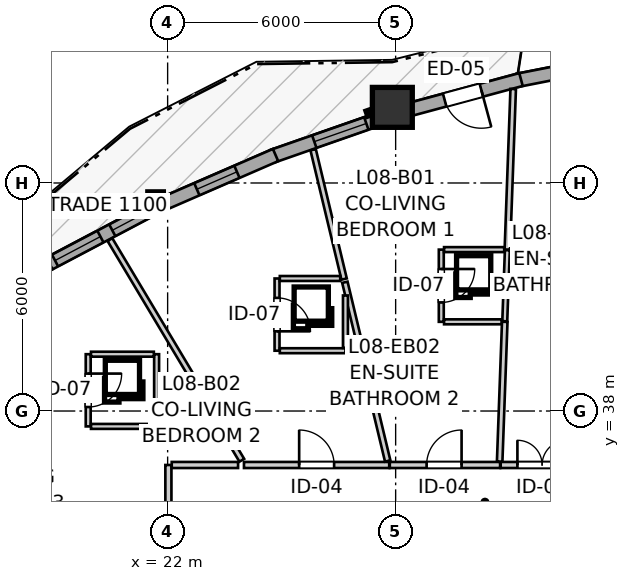
"""IFC4 building model, lengths in metres.
Left out: names, types, materials, properties, quantities, classifications, styles, units other than length and angle.
Written with IfcOpenShell. Run it as: python <this file> out.ifc"""

import sys

from ifc_helpers import new_model, si_unit, direction, frame, frame_2d, origin, origin_2d, place, context, subcontext, project, spatial, rectangle, i_section, extrude, source, transform, mapped, element, fill, save


model = new_model("IFC4")
c1 = context("Model", 3, precision=1e-05, world=origin(), true_north=direction((0.0, 1.0)))
c2 = subcontext(c1, "Body", "Model", "MODEL_VIEW")
j1 = project(units=[si_unit("LENGTHUNIT", "METRE"), si_unit("PLANEANGLEUNIT", "RADIAN")], contexts=[c1])
p1 = place(None, origin())
s1 = spatial("IfcSite", under=j1, at=p1, CompositionType="ELEMENT")
p2 = place(p1, origin())
s2 = spatial("IfcBuilding", under=s1, at=p2, CompositionType="ELEMENT")
p3 = place(p2, frame((0.0, 0.0, 30.2)))
s3 = spatial("IfcBuildingStorey", under=s2, at=p3, CompositionType="ELEMENT", Elevation=30.2)
m1 = source(origin(), c2, "Body", "SweptSolid", [
    extrude(rectangle(XDim=1.05, YDim=1.05, at=origin_2d()), origin(), (0.0, 0.0, 1.0), 2.935),
])
p4 = place(p3, frame((27.913, 45.99, 0.0), z_axis=(0.0, 0.0, 1.0), x_axis=(1.0, 0.0, 0.0)))
e1 = element("IfcColumn", 1, at=p4, inside=s3, PredefinedType="COLUMN", context=c2, shape_type="MappedRepresentation", body=[
    mapped(m1, transform((0.0, 0.0, 0.0), x_axis=(1.0, 0.0, 0.0), y_axis=(0.0, 1.0, 0.0), z_axis=(0.0, 0.0, 1.0), scale=1.0)),
])
m2 = source(origin(), c2, "Body", "SweptSolid", [
    extrude(i_section(OverallWidth=0.409, OverallDepth=0.425, WebThickness=0.03, FlangeThickness=0.048, FilletRadius=0.015, at=origin_2d()), origin(), (0.0, 0.0, 1.0), 2.935),
])
p5 = place(p3, frame((21.683, 43.554, 0.0), z_axis=(0.0, 0.0, 1.0), x_axis=(1.0, 0.0, 0.0)))
e2 = element("IfcColumn", 2, at=p5, inside=s3, PredefinedType="PILASTER", context=c2, shape_type="MappedRepresentation", body=[
    mapped(m2, transform((0.0, 0.0, 0.0), x_axis=(1.0, 0.0, 0.0), y_axis=(0.0, 1.0, 0.0), z_axis=(0.0, 0.0, 1.0), scale=1.0)),
])
p6 = place(p3, frame((34.659, 47.38, 0.0), z_axis=(0.0, 0.0, 1.0), x_axis=(-0.981222284826, -0.19288034571, 0.0)))
e3 = element("IfcWall", 3, at=p6, inside=s3, PredefinedType="SOLIDWALL", context=c2, shape_type="SweptSolid", body=[
    extrude(rectangle(XDim=3.512, YDim=0.35, at=frame_2d((1.756, 0.0))), origin(), (0.0, 0.0, 1.0), 2.415),
])
p7 = place(p6, frame((1.021, 0.0, 0.82)))
e4 = element("IfcOpeningElement", 4, at=p7, cuts=e3, PredefinedType="OPENING", context=c2, shape_type="SweptSolid", body=[
    extrude(rectangle(XDim=1.45, YDim=1.25, at=frame_2d((0.725, 0.625))), frame((0.0, 0.185, 0.0), z_axis=(0.0, -1.0, 0.0), x_axis=(1.0, 0.0, 0.0)), (0.0, 0.0, 1.0), 0.37),
])
p8 = place(p3, frame((31.298, 46.722, 0.0), z_axis=(0.0, 0.0, 1.0), x_axis=(-0.965455913242, -0.260566459057, 0.0)))
e5 = element("IfcWall", 5, at=p8, inside=s3, PredefinedType="SOLIDWALL", context=c2, shape_type="SweptSolid", body=[
    extrude(rectangle(XDim=3.159, YDim=0.35, at=frame_2d((1.58, 0.0))), origin(), (0.0, 0.0, 1.0), 2.415),
])
p9 = place(p8, frame((1.08, 0.0, 0.0)))
e6 = element("IfcOpeningElement", 6, at=p9, cuts=e5, PredefinedType="OPENING", context=c2, shape_type="SweptSolid", body=[
    extrude(rectangle(XDim=1.0, YDim=2.1, at=frame_2d((0.5, 1.05))), frame((0.0, 0.185, 0.0), z_axis=(0.0, -1.0, 0.0), x_axis=(1.0, 0.0, 0.0)), (0.0, 0.0, 1.0), 0.37),
])
p10 = place(p3, frame((27.687, 45.726, 0.0), z_axis=(0.0, 0.0, 1.0), x_axis=(-0.9441205041, -0.329600475936, 0.0)))
e7 = element("IfcWall", 7, at=p10, inside=s3, PredefinedType="SOLIDWALL", context=c2, shape_type="SweptSolid", body=[
    extrude(rectangle(XDim=3.104, YDim=0.35, at=frame_2d((1.552, 0.0))), origin(), (0.0, 0.0, 1.0), 2.415),
])
p11 = place(p10, frame((0.486, 0.0, 0.82)))
e8 = element("IfcOpeningElement", 8, at=p11, cuts=e7, PredefinedType="OPENING", context=c2, shape_type="SweptSolid", body=[
    extrude(rectangle(XDim=1.45, YDim=1.25, at=frame_2d((0.725, 0.625))), frame((0.0, 0.185, 0.0), z_axis=(0.0, -1.0, 0.0), x_axis=(1.0, 0.0, 0.0)), (0.0, 0.0, 1.0), 0.37),
])
p12 = place(p3, frame((24.84, 44.735, 0.0), z_axis=(0.0, 0.0, 1.0), x_axis=(-0.917090935142, -0.398678086532, 0.0)))
e9 = element("IfcWall", 9, at=p12, inside=s3, PredefinedType="SOLIDWALL", context=c2, shape_type="SweptSolid", body=[
    extrude(rectangle(XDim=3.346, YDim=0.35, at=frame_2d((1.673, 0.0))), origin(), (0.0, 0.0, 1.0), 2.415),
])
p13 = place(p12, frame((1.108, 0.0, 0.82)))
e10 = element("IfcOpeningElement", 10, at=p13, cuts=e9, PredefinedType="OPENING", context=c2, shape_type="SweptSolid", body=[
    extrude(rectangle(XDim=1.15, YDim=1.2, at=frame_2d((0.575, 0.6))), frame((0.0, 0.185, 0.0), z_axis=(0.0, -1.0, 0.0), x_axis=(1.0, 0.0, 0.0)), (0.0, 0.0, 1.0), 0.37),
])
p14 = place(p3, frame((21.747, 43.39, 0.0), z_axis=(0.0, 0.0, 1.0), x_axis=(-0.88437802144, -0.46677137358, 0.0)))
e11 = element("IfcWall", 11, at=p14, inside=s3, PredefinedType="SOLIDWALL", context=c2, shape_type="SweptSolid", body=[
    extrude(rectangle(XDim=3.327, YDim=0.35, at=frame_2d((1.664, 0.0))), origin(), (0.0, 0.0, 1.0), 2.415),
])
p15 = place(p14, frame((0.311, 0.0, 0.82)))
e12 = element("IfcOpeningElement", 12, at=p15, cuts=e11, PredefinedType="OPENING", context=c2, shape_type="SweptSolid", body=[
    extrude(rectangle(XDim=1.05, YDim=1.45, at=frame_2d((0.525, 0.725))), frame((0.0, 0.185, 0.0), z_axis=(0.0, -1.0, 0.0), x_axis=(1.0, 0.0, 0.0)), (0.0, 0.0, 1.0), 0.37),
])
p16 = place(p14, frame((1.714, 0.0, 0.82)))
e13 = element("IfcOpeningElement", 13, at=p16, cuts=e11, PredefinedType="OPENING", context=c2, shape_type="SweptSolid", body=[
    extrude(rectangle(XDim=1.35, YDim=1.45, at=frame_2d((0.675, 0.725))), frame((0.0, 0.185, 0.0), z_axis=(0.0, -1.0, 0.0), x_axis=(1.0, 0.0, 0.0)), (0.0, 0.0, 1.0), 0.37),
])
p17 = place(p3, frame((18.882, 41.882, 0.0), z_axis=(0.0, 0.0, 1.0), x_axis=(-0.846428134238, -0.53250297048, 0.0)))
e14 = element("IfcWall", 14, at=p17, inside=s3, PredefinedType="SOLIDWALL", context=c2, shape_type="SweptSolid", body=[
    extrude(rectangle(XDim=3.047, YDim=0.35, at=frame_2d((1.523, 0.0))), origin(), (0.0, 0.0, 1.0), 2.415),
])
p18 = place(p17, frame((0.803, 0.0, 0.82)))
e15 = element("IfcOpeningElement", 15, at=p18, cuts=e14, PredefinedType="OPENING", context=c2, shape_type="SweptSolid", body=[
    extrude(rectangle(XDim=1.45, YDim=1.25, at=frame_2d((0.725, 0.625))), frame((0.0, 0.185, 0.0), z_axis=(0.0, -1.0, 0.0), x_axis=(1.0, 0.0, 0.0)), (0.0, 0.0, 1.0), 0.37),
])
p19 = place(p3, frame((22.02, 32.71, 0.0), z_axis=(0.0, 0.0, 1.0), x_axis=(0.0, 1.0, 0.0)))
e16 = element("IfcWall", 16, at=p19, inside=s3, PredefinedType="PARTITIONING", context=c2, shape_type="SweptSolid", body=[
    extrude(rectangle(XDim=3.87, YDim=0.16, at=frame_2d((1.935, 0.0))), origin(), (0.0, 0.0, 1.0), 2.935),
])
p20 = place(p19, frame((1.485, 0.0, 0.0)))
e17 = element("IfcOpeningElement", 17, at=p20, cuts=e16, PredefinedType="OPENING", context=c2, shape_type="SweptSolid", body=[
    extrude(rectangle(XDim=0.92, YDim=2.1, at=frame_2d((0.46, 1.05))), frame((0.0, 0.09, 0.0), z_axis=(0.0, -1.0, 0.0), x_axis=(1.0, 0.0, 0.0)), (0.0, 0.0, 1.0), 0.18),
])
p21 = place(p3, frame((24.009, 36.58, 0.0), z_axis=(0.0, 0.0, 1.0), x_axis=(1.0, 0.0, 0.0)))
e18 = element("IfcWall", 18, at=p21, inside=s3, PredefinedType="PARTITIONING", context=c2, shape_type="SweptSolid", body=[
    extrude(rectangle(XDim=3.822, YDim=0.16, at=frame_2d((1.911, 0.0))), origin(), (0.0, 0.0, 1.0), 2.543),
])
p22 = place(p21, frame((1.452, 0.0, 0.0)))
e19 = element("IfcOpeningElement", 19, at=p22, cuts=e18, PredefinedType="OPENING", context=c2, shape_type="SweptSolid", body=[
    extrude(rectangle(XDim=0.92, YDim=2.1, at=frame_2d((0.46, 1.05))), frame((0.0, 0.09, 0.0), z_axis=(0.0, -1.0, 0.0), x_axis=(1.0, 0.0, 0.0)), (0.0, 0.0, 1.0), 0.18),
])
p23 = place(p3, frame((27.846, 36.58, 0.0), z_axis=(0.0, 0.0, 1.0), x_axis=(1.0, 0.0, 0.0)))
e20 = element("IfcWall", 20, at=p23, inside=s3, PredefinedType="PARTITIONING", context=c2, shape_type="SweptSolid", body=[
    extrude(rectangle(XDim=2.903, YDim=0.16, at=frame_2d((1.452, 0.0))), origin(), (0.0, 0.0, 1.0), 2.935),
])
p24 = place(p23, frame((0.969, 0.0, 0.0)))
e21 = element("IfcOpeningElement", 21, at=p24, cuts=e20, PredefinedType="OPENING", context=c2, shape_type="SweptSolid", body=[
    extrude(rectangle(XDim=0.92, YDim=2.1, at=frame_2d((0.46, 1.05))), frame((0.0, 0.09, 0.0), z_axis=(0.0, -1.0, 0.0), x_axis=(1.0, 0.0, 0.0)), (0.0, 0.0, 1.0), 0.18),
])
p25 = place(p3, frame((30.764, 36.58, 0.0), z_axis=(0.0, 0.0, 1.0), x_axis=(1.0, 0.0, 0.0)))
e22 = element("IfcWall", 22, at=p25, inside=s3, PredefinedType="PARTITIONING", context=c2, shape_type="SweptSolid", body=[
    extrude(rectangle(XDim=2.225, YDim=0.16, at=frame_2d((1.113, 0.0))), origin(), (0.0, 0.0, 1.0), 2.935),
])
p26 = place(p25, frame((0.44, 0.0, 0.0)))
e23 = element("IfcOpeningElement", 23, at=p26, cuts=e22, PredefinedType="OPENING", context=c2, shape_type="SweptSolid", body=[
    extrude(rectangle(XDim=1.3, YDim=2.1, at=frame_2d((0.65, 1.05))), frame((0.0, 0.09, 0.0), z_axis=(0.0, -1.0, 0.0), x_axis=(1.0, 0.0, 0.0)), (0.0, 0.0, 1.0), 0.18),
])
p27 = place(p3, frame((29.201, 42.247, 0.0), z_axis=(0.0, 0.0, 1.0), x_axis=(0.0, -1.0, 0.0)))
e24 = element("IfcWall", 24, at=p27, inside=s3, PredefinedType="PARTITIONING", context=c2, shape_type="SweptSolid", body=[
    extrude(rectangle(XDim=1.9, YDim=0.13, at=frame_2d((0.95, 0.0))), origin(), (0.0, 0.0, 1.0), 2.935),
])
p28 = place(p27, frame((0.51, 0.0, 0.0)))
e25 = element("IfcOpeningElement", 25, at=p28, cuts=e24, PredefinedType="OPENING", context=c2, shape_type="SweptSolid", body=[
    extrude(rectangle(XDim=0.88, YDim=2.05, at=frame_2d((0.44, 1.025))), frame((0.0, 0.075, 0.0), z_axis=(0.0, -1.0, 0.0), x_axis=(1.0, 0.0, 0.0)), (0.0, 0.0, 1.0), 0.15),
])
p29 = place(p3, frame((24.879, 41.487, 0.0), z_axis=(0.0, 0.0, 1.0), x_axis=(0.0, -1.0, 0.0)))
e26 = element("IfcWall", 26, at=p29, inside=s3, PredefinedType="PARTITIONING", context=c2, shape_type="SweptSolid", body=[
    extrude(rectangle(XDim=1.9, YDim=0.13, at=frame_2d((0.95, 0.0))), origin(), (0.0, 0.0, 1.0), 2.935),
])
p30 = place(p29, frame((0.51, 0.0, 0.0)))
e27 = element("IfcOpeningElement", 27, at=p30, cuts=e26, PredefinedType="OPENING", context=c2, shape_type="SweptSolid", body=[
    extrude(rectangle(XDim=0.88, YDim=2.05, at=frame_2d((0.44, 1.025))), frame((0.0, 0.075, 0.0), z_axis=(0.0, -1.0, 0.0), x_axis=(1.0, 0.0, 0.0)), (0.0, 0.0, 1.0), 0.15),
])
p31 = place(p3, frame((19.91, 39.495, 0.0), z_axis=(0.0, 0.0, 1.0), x_axis=(0.0, -1.0, 0.0)))
e28 = element("IfcWall", 28, at=p31, inside=s3, PredefinedType="PARTITIONING", context=c2, shape_type="SweptSolid", body=[
    extrude(rectangle(XDim=1.9, YDim=0.13, at=frame_2d((0.95, 0.0))), origin(), (0.0, 0.0, 1.0), 2.935),
])
p32 = place(p31, frame((0.51, 0.0, 0.0)))
e29 = element("IfcOpeningElement", 29, at=p32, cuts=e28, PredefinedType="OPENING", context=c2, shape_type="SweptSolid", body=[
    extrude(rectangle(XDim=0.88, YDim=2.05, at=frame_2d((0.44, 1.025))), frame((0.0, 0.075, 0.0), z_axis=(0.0, -1.0, 0.0), x_axis=(1.0, 0.0, 0.0)), (0.0, 0.0, 1.0), 0.15),
])
p33 = place(p3, frame((11.92, 36.618, 0.0), z_axis=(0.0, 0.0, 1.0), x_axis=(0.866473494239, -0.499223080177, 0.0)))
e30 = element("IfcWall", 30, at=p33, inside=s3, PredefinedType="PARTITIONING", context=c2, shape_type="SweptSolid", body=[
    extrude(rectangle(XDim=11.514, YDim=0.145, at=frame_2d((5.757, 0.0))), origin(), (0.0, 0.0, 1.0), 2.935),
])
p34 = place(p3, frame((14.566, 38.751, 0.0), z_axis=(0.0, 0.0, 1.0), x_axis=(0.777881688073, -0.628410756879, 0.0)))
e31 = element("IfcWall", 31, at=p34, inside=s3, PredefinedType="PARTITIONING", context=c2, shape_type="SweptSolid", body=[
    extrude(rectangle(XDim=9.413, YDim=0.145, at=frame_2d((4.707, 0.0))), origin(), (0.0, 0.0, 1.0), 2.935),
])
p35 = place(p3, frame((20.481, 42.51, 0.0), z_axis=(0.0, 0.0, 1.0), x_axis=(0.513067331262, -0.858348363773, 0.0)))
e32 = element("IfcWall", 32, at=p35, inside=s3, PredefinedType="PARTITIONING", context=c2, shape_type="SweptSolid", body=[
    extrude(rectangle(XDim=6.765, YDim=0.145, at=frame_2d((3.382, 0.0))), origin(), (0.0, 0.0, 1.0), 2.935),
])
p36 = place(p3, frame((26.664, 41.388, 0.0), z_axis=(0.0, 0.0, 1.0), x_axis=(0.233021630241, -0.972471552201, 0.0)))
e33 = element("IfcWall", 33, at=p36, inside=s3, PredefinedType="PARTITIONING", context=c2, shape_type="SweptSolid", body=[
    extrude(rectangle(XDim=4.836, YDim=0.145, at=frame_2d((2.418, 0.0))), origin(), (0.0, 0.0, 1.0), 2.935),
])
p37 = place(p3, frame((30.94, 42.247, 0.0), z_axis=(0.0, 0.0, 1.0), x_axis=(0.03624948077, 0.999342771597, 0.0)))
e34 = element("IfcWall", 34, at=p37, inside=s3, PredefinedType="PARTITIONING", context=c2, shape_type="SweptSolid", body=[
    extrude(rectangle(XDim=4.229, YDim=0.145, at=frame_2d((2.115, 0.0))), origin(), (0.0, 0.0, 1.0), 2.935),
])
p38 = place(p3, frame((30.737, 36.671, 0.0), z_axis=(0.0, 0.0, 1.0), x_axis=(0.036368539535, 0.999338445839, 0.0)))
e35 = element("IfcWall", 35, at=p38, inside=s3, PredefinedType="PARTITIONING", context=c2, shape_type="SweptSolid", body=[
    extrude(rectangle(XDim=3.679, YDim=0.145, at=frame_2d((1.839, 0.0))), origin(), (0.0, 0.0, 1.0), 2.935),
])
p39 = place(p3, frame((25.829, 44.875, 0.0), z_axis=(0.0, 0.0, 1.0), x_axis=(0.232921769711, -0.972495475154, 0.0)))
e36 = element("IfcWall", 36, at=p39, inside=s3, PredefinedType="PARTITIONING", context=c2, shape_type="SweptSolid", body=[
    extrude(rectangle(XDim=3.5, YDim=0.145, at=frame_2d((1.75, 0.0))), origin(), (0.0, 0.0, 1.0), 2.935),
])
p40 = place(p3, frame((22.108, 36.58, 0.0), z_axis=(0.0, 0.0, 1.0), x_axis=(1.0, 0.0, 0.0)))
e37 = element("IfcWall", 37, at=p40, inside=s3, PredefinedType="PARTITIONING", context=c2, shape_type="SweptSolid", body=[
    extrude(rectangle(XDim=1.746, YDim=0.16, at=frame_2d((0.873, 0.0))), origin(), (0.0, 0.0, 1.0), 2.543),
])
p41 = place(p3, frame((21.71, 37.595, 0.0), z_axis=(0.0, 0.0, 1.0), x_axis=(0.0, 1.0, 0.0)))
e38 = element("IfcWall", 38, at=p41, inside=s3, PredefinedType="PARTITIONING", context=c2, shape_type="SweptSolid", body=[
    extrude(rectangle(XDim=1.9, YDim=0.13, at=frame_2d((0.95, 0.0))), origin(), (0.0, 0.0, 1.0), 2.935),
])
p42 = place(p3, frame((30.872, 40.362, 0.0), z_axis=(0.0, 0.0, 1.0), x_axis=(0.036273279858, 0.999341908042, 0.0)))
e39 = element("IfcWall", 39, at=p42, inside=s3, PredefinedType="PARTITIONING", context=c2, shape_type="SweptSolid", body=[
    extrude(rectangle(XDim=1.871, YDim=0.13, at=frame_2d((0.936, 0.0))), origin(), (0.0, 0.0, 1.0), 2.935),
])
for number, where, z_axis, x_axis in (
    (40, (19.983, 39.495, 0.0), (0.0, 0.0, 1.0), (1.0, 0.0, 0.0)),
    (41, (19.983, 37.595, 0.0), (0.0, 0.0, 1.0), (1.0, 0.0, 0.0)),
):
    element("IfcWall", number, at=place(p3, frame(where, z_axis=z_axis, x_axis=x_axis)), inside=s3, PredefinedType="PARTITIONING", context=c2, shape_type="SweptSolid", body=[
        extrude(rectangle(XDim=1.654, YDim=0.13, at=frame_2d((0.827, 0.0))), origin(), (0.0, 0.0, 1.0), 2.935),
    ])
p43 = place(p3, frame((24.952, 39.587, 0.0), z_axis=(0.0, 0.0, 1.0), x_axis=(1.0, 0.0, 0.0)))
e42 = element("IfcWall", 42, at=p43, inside=s3, PredefinedType="PARTITIONING", context=c2, shape_type="SweptSolid", body=[
    extrude(rectangle(XDim=1.727, YDim=0.13, at=frame_2d((0.864, 0.0))), origin(), (0.0, 0.0, 1.0), 2.935),
])
p44 = place(p3, frame((24.952, 41.487, 0.0), z_axis=(0.0, 0.0, 1.0), x_axis=(1.0, 0.0, 0.0)))
e43 = element("IfcWall", 43, at=p44, inside=s3, PredefinedType="PARTITIONING", context=c2, shape_type="SweptSolid", body=[
    extrude(rectangle(XDim=1.59, YDim=0.13, at=frame_2d((0.795, 0.0))), origin(), (0.0, 0.0, 1.0), 2.503),
])
p45 = place(p3, frame((29.274, 42.247, 0.0), z_axis=(0.0, 0.0, 1.0), x_axis=(1.0, 0.0, 0.0)))
e44 = element("IfcWall", 44, at=p45, inside=s3, PredefinedType="PARTITIONING", context=c2, shape_type="SweptSolid", body=[
    extrude(rectangle(XDim=1.583, YDim=0.13, at=frame_2d((0.792, 0.0))), origin(), (0.0, 0.0, 1.0), 2.503),
])
p46 = place(p3, frame((26.679, 39.66, 0.0), z_axis=(0.0, 0.0, 1.0), x_axis=(0.0, 1.0, 0.0)))
e45 = element("IfcWall", 45, at=p46, inside=s3, PredefinedType="PARTITIONING", context=c2, shape_type="SweptSolid", body=[
    extrude(rectangle(XDim=1.38, YDim=0.13, at=frame_2d((0.69, 0.0))), origin(), (0.0, 0.0, 1.0), 2.935),
])
p47 = place(p3, frame((29.274, 40.347, 0.0), z_axis=(0.0, 0.0, 1.0), x_axis=(1.0, 0.0, 0.0)))
e46 = element("IfcWall", 46, at=p47, inside=s3, PredefinedType="PARTITIONING", context=c2, shape_type="SweptSolid", body=[
    extrude(rectangle(XDim=1.514, YDim=0.13, at=frame_2d((0.757, 0.0))), origin(), (0.0, 0.0, 1.0), 2.935),
])
m3 = source(origin(), c2, "Body", "SweptSolid", [
    extrude(rectangle(XDim=1.45, YDim=1.25, at=frame_2d((0.725, 0.625))), frame((0.0, 0.03, 0.0), z_axis=(0.0, -1.0, 0.0), x_axis=(1.0, 0.0, 0.0)), (0.0, 0.0, 1.0), 0.06),
])
p48 = place(p11, origin())
e47 = element("IfcWindow", 47, at=p48, inside=s3, PartitioningType="SINGLE_PANEL", PredefinedType="WINDOW", context=c2, shape_type="MappedRepresentation", body=[
    mapped(m3, transform((0.0, 0.0, 0.0), x_axis=(1.0, 0.0, 0.0), y_axis=(0.0, 1.0, 0.0), z_axis=(0.0, 0.0, 1.0), scale=1.0)),
])
fill(e8, e47)
m4 = source(origin(), c2, "Body", "SweptSolid", [
    extrude(rectangle(XDim=1.15, YDim=1.2, at=frame_2d((0.575, 0.6))), frame((0.0, 0.03, 0.0), z_axis=(0.0, -1.0, 0.0), x_axis=(1.0, 0.0, 0.0)), (0.0, 0.0, 1.0), 0.06),
])
p49 = place(p13, origin())
e48 = element("IfcWindow", 48, at=p49, inside=s3, PartitioningType="SINGLE_PANEL", PredefinedType="WINDOW", context=c2, shape_type="MappedRepresentation", body=[
    mapped(m4, transform((0.0, 0.0, 0.0), x_axis=(1.0, 0.0, 0.0), y_axis=(0.0, 1.0, 0.0), z_axis=(0.0, 0.0, 1.0), scale=1.0)),
])
fill(e10, e48)
m5 = source(origin(), c2, "Body", "SweptSolid", [
    extrude(rectangle(XDim=1.05, YDim=1.45, at=frame_2d((0.525, 0.725))), frame((0.0, 0.03, 0.0), z_axis=(0.0, -1.0, 0.0), x_axis=(1.0, 0.0, 0.0)), (0.0, 0.0, 1.0), 0.06),
])
p50 = place(p15, origin())
e49 = element("IfcWindow", 49, at=p50, inside=s3, PartitioningType="SINGLE_PANEL", PredefinedType="WINDOW", context=c2, shape_type="MappedRepresentation", body=[
    mapped(m5, transform((0.0, 0.0, 0.0), x_axis=(1.0, 0.0, 0.0), y_axis=(0.0, 1.0, 0.0), z_axis=(0.0, 0.0, 1.0), scale=1.0)),
])
fill(e12, e49)
m6 = source(origin(), c2, "Body", "SweptSolid", [
    extrude(rectangle(XDim=1.35, YDim=1.45, at=frame_2d((0.675, 0.725))), frame((0.0, 0.03, 0.0), z_axis=(0.0, -1.0, 0.0), x_axis=(1.0, 0.0, 0.0)), (0.0, 0.0, 1.0), 0.06),
])
p51 = place(p16, origin())
e50 = element("IfcWindow", 50, at=p51, inside=s3, PartitioningType="SINGLE_PANEL", PredefinedType="WINDOW", context=c2, shape_type="MappedRepresentation", body=[
    mapped(m6, transform((0.0, 0.0, 0.0), x_axis=(1.0, 0.0, 0.0), y_axis=(0.0, 1.0, 0.0), z_axis=(0.0, 0.0, 1.0), scale=1.0)),
])
fill(e13, e50)
m7 = source(origin(), c2, "Body", "SweptSolid", [
    extrude(rectangle(XDim=1.0, YDim=2.1, at=frame_2d((0.5, 1.05))), frame((0.0, 0.025, 0.0), z_axis=(0.0, -1.0, 0.0), x_axis=(1.0, 0.0, 0.0)), (0.0, 0.0, 1.0), 0.05),
])
p52 = place(p9, origin())
e51 = element("IfcDoor", 51, at=p52, inside=s3, OperationType="SINGLE_SWING_LEFT", PredefinedType="DOOR", context=c2, shape_type="MappedRepresentation", body=[
    mapped(m7, transform((0.0, 0.0, 0.0), x_axis=(1.0, 0.0, 0.0), y_axis=(0.0, 1.0, 0.0), z_axis=(0.0, 0.0, 1.0), scale=1.0)),
])
fill(e6, e51)
m8 = source(origin(), c2, "Body", "SweptSolid", [
    extrude(rectangle(XDim=0.92, YDim=2.1, at=frame_2d((0.46, 1.05))), frame((0.0, 0.025, 0.0), z_axis=(0.0, -1.0, 0.0), x_axis=(1.0, 0.0, 0.0)), (0.0, 0.0, 1.0), 0.05),
])
p53 = place(p22, origin())
e52 = element("IfcDoor", 52, at=p53, inside=s3, OperationType="SINGLE_SWING_LEFT", PredefinedType="DOOR", context=c2, shape_type="MappedRepresentation", body=[
    mapped(m8, transform((0.0, 0.0, 0.0), x_axis=(1.0, 0.0, 0.0), y_axis=(0.0, 1.0, 0.0), z_axis=(0.0, 0.0, 1.0), scale=1.0)),
])
fill(e19, e52)
p54 = place(p24, origin())
e53 = element("IfcDoor", 53, at=p54, inside=s3, OperationType="SINGLE_SWING_RIGHT", PredefinedType="DOOR", context=c2, shape_type="MappedRepresentation", body=[
    mapped(m8, transform((0.0, 0.0, 0.0), x_axis=(1.0, 0.0, 0.0), y_axis=(0.0, 1.0, 0.0), z_axis=(0.0, 0.0, 1.0), scale=1.0)),
])
fill(e21, e53)
m9 = source(origin(), c2, "Body", "SweptSolid", [
    extrude(rectangle(XDim=1.3, YDim=2.1, at=frame_2d((0.65, 1.05))), frame((0.0, 0.025, 0.0), z_axis=(0.0, -1.0, 0.0), x_axis=(1.0, 0.0, 0.0)), (0.0, 0.0, 1.0), 0.05),
])
p55 = place(p26, origin())
e54 = element("IfcDoor", 54, at=p55, inside=s3, OperationType="DOUBLE_DOOR_SINGLE_SWING", PredefinedType="DOOR", context=c2, shape_type="MappedRepresentation", body=[
    mapped(m9, transform((0.0, 0.0, 0.0), x_axis=(1.0, 0.0, 0.0), y_axis=(0.0, 1.0, 0.0), z_axis=(0.0, 0.0, 1.0), scale=1.0)),
])
fill(e23, e54)
m10 = source(origin(), c2, "Body", "SweptSolid", [
    extrude(rectangle(XDim=0.88, YDim=2.05, at=frame_2d((0.44, 1.025))), frame((0.0, 0.025, 0.0), z_axis=(0.0, -1.0, 0.0), x_axis=(1.0, 0.0, 0.0)), (0.0, 0.0, 1.0), 0.05),
])
p56 = place(p28, origin())
e55 = element("IfcDoor", 55, at=p56, inside=s3, OperationType="SINGLE_SWING_LEFT", PredefinedType="DOOR", context=c2, shape_type="MappedRepresentation", body=[
    mapped(m10, transform((0.0, 0.0, 0.0), x_axis=(1.0, 0.0, 0.0), y_axis=(0.0, 1.0, 0.0), z_axis=(0.0, 0.0, 1.0), scale=1.0)),
])
fill(e25, e55)
p57 = place(p30, origin())
e56 = element("IfcDoor", 56, at=p57, inside=s3, OperationType="SINGLE_SWING_RIGHT", PredefinedType="DOOR", context=c2, shape_type="MappedRepresentation", body=[
    mapped(m10, transform((0.0, 0.0, 0.0), x_axis=(1.0, 0.0, 0.0), y_axis=(0.0, 1.0, 0.0), z_axis=(0.0, 0.0, 1.0), scale=1.0)),
])
fill(e27, e56)
p58 = place(p32, origin())
e57 = element("IfcDoor", 57, at=p58, inside=s3, OperationType="SINGLE_SWING_LEFT", PredefinedType="DOOR", context=c2, shape_type="MappedRepresentation", body=[
    mapped(m10, transform((0.0, 0.0, 0.0), x_axis=(1.0, 0.0, 0.0), y_axis=(0.0, 1.0, 0.0), z_axis=(0.0, 0.0, 1.0), scale=1.0)),
])
fill(e29, e57)
save(model, sys.argv[1])
